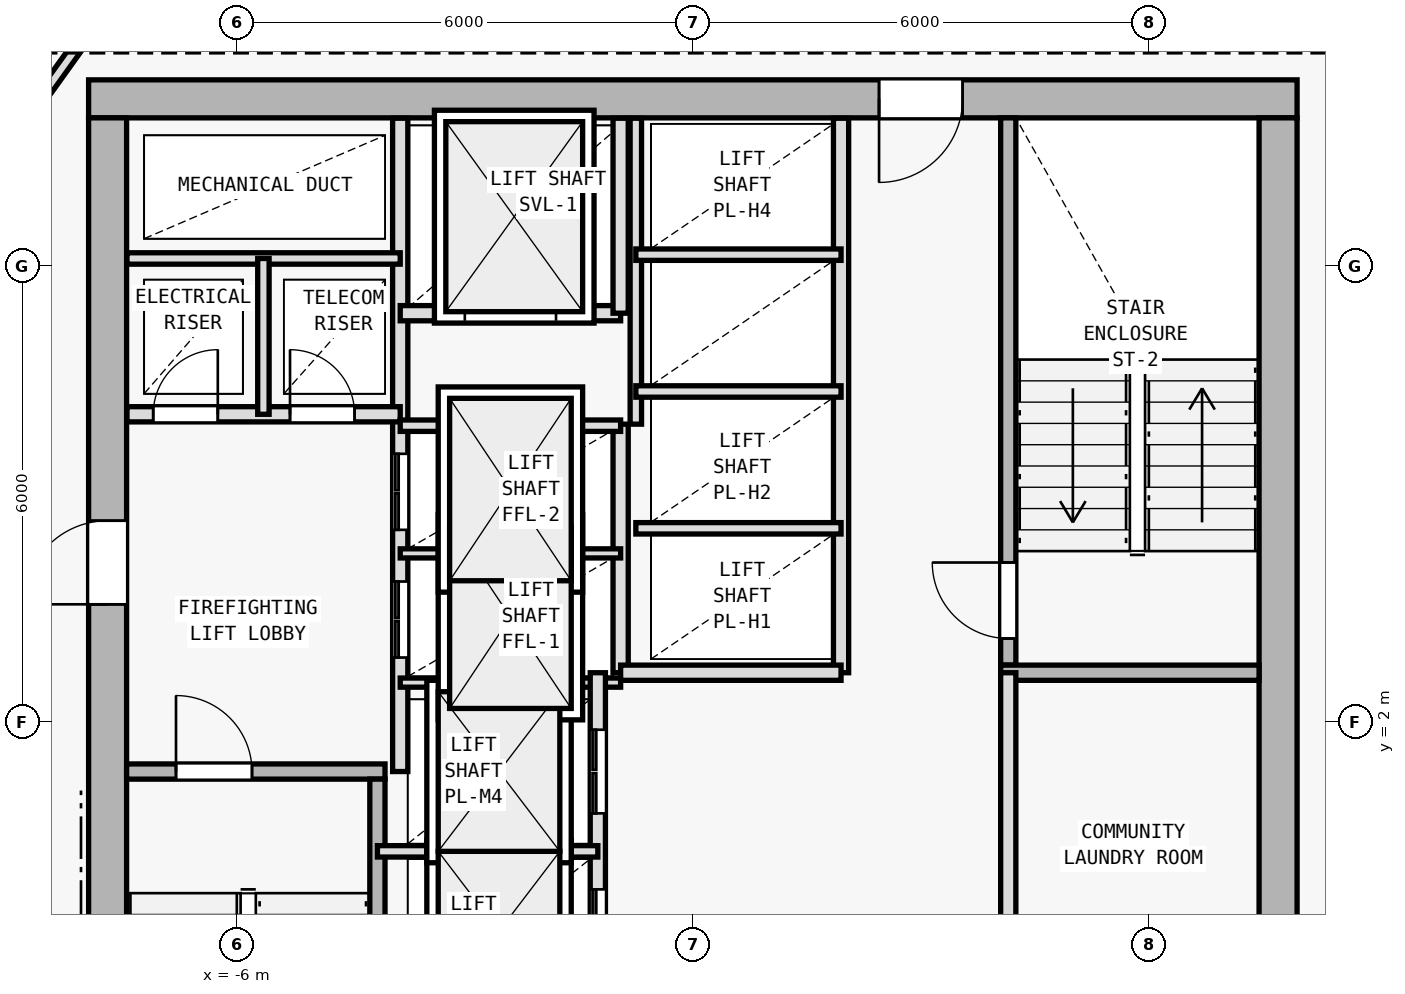
"""IFC4 building model, lengths in metres.
Left out: names, types, materials, properties, quantities, classifications, styles, units other than length and angle.
Written with IfcOpenShell. Run it as: python <this file> out.ifc"""

import sys

from ifc_helpers import new_model, si_unit, direction, frame, frame_2d, origin, origin_2d, place, context, subcontext, project, spatial, rectangle, i_section, extrude, element, fill, save


model = new_model("IFC4")
c1 = context("Model", 3, precision=1e-05, world=origin(), true_north=direction((0.0, 1.0)))
c2 = subcontext(c1, "Body", "Model", "MODEL_VIEW")
j1 = project(units=[si_unit("LENGTHUNIT", "METRE"), si_unit("PLANEANGLEUNIT", "RADIAN")], contexts=[c1])
p1 = place(None, origin())
s1 = spatial("IfcSite", under=j1, at=p1, CompositionType="ELEMENT")
p2 = place(p1, origin())
s2 = spatial("IfcBuilding", under=s1, at=p2, CompositionType="ELEMENT")
p3 = place(p2, frame((0.0, 0.0, 156.6)))
s3 = spatial("IfcBuildingStorey", under=s2, at=p3, CompositionType="ELEMENT", Elevation=156.6)
for number, where, z_axis, x_axis in (
    (1, (7.7, 10.2, 0.0), (0.0, 0.0, 1.0), (1.0, 0.0, 0.0)),
    (2, (-7.7, 10.2, 0.0), (0.0, 0.0, 1.0), (1.0, 0.0, 0.0)),
    (3, (7.7, 0.4, 0.0), (0.0, 0.0, 1.0), (1.0, 0.0, 0.0)),
    (4, (-7.7, 2.0, 0.0), (0.0, 0.0, 1.0), (1.0, 0.0, 0.0)),
):
    element("IfcColumn", number, at=place(p3, frame(where, z_axis=z_axis, x_axis=x_axis)), inside=s3, PredefinedType="COLUMN", context=c2, shape_type="SweptSolid", body=[
        extrude(i_section(OverallWidth=0.404, OverallDepth=0.407, WebThickness=0.017, FlangeThickness=0.028, FilletRadius=0.015, at=origin_2d()), origin(), (0.0, 0.0, 1.0), 3.6),
    ])
p4 = place(p3, frame((7.95, 10.2, 0.0), z_axis=(0.0, 0.0, 1.0), x_axis=(-1.0, 0.0, 0.0)))
e5 = element("IfcWall", 5, at=p4, inside=s3, PredefinedType="SHEAR", context=c2, shape_type="SweptSolid", body=[
    extrude(rectangle(XDim=15.9, YDim=0.5, at=frame_2d((7.95, 0.0))), origin(), (0.0, 0.0, 1.0), 3.35),
])
p5 = place(p4, frame((4.4, 0.0, 0.0)))
e6 = element("IfcOpeningElement", 6, at=p5, cuts=e5, PredefinedType="OPENING", context=c2, shape_type="SweptSolid", body=[
    extrude(rectangle(XDim=1.1, YDim=2.15, at=frame_2d((0.55, 1.075))), frame((0.0, 0.26, 0.0), z_axis=(0.0, -1.0, 0.0), x_axis=(1.0, 0.0, 0.0)), (0.0, 0.0, 1.0), 0.52),
])
p6 = place(p3, frame((-7.7, -9.15, 0.0), z_axis=(0.0, 0.0, 1.0), x_axis=(0.0, 1.0, 0.0)))
e7 = element("IfcWall", 7, at=p6, inside=s3, PredefinedType="SHEAR", context=c2, shape_type="SweptSolid", body=[
    extrude(rectangle(XDim=19.1, YDim=0.5, at=frame_2d((9.55, 0.0))), origin(), (0.0, 0.0, 1.0), 3.35),
])
p7 = place(p6, frame((12.7, 0.0, 0.0)))
e8 = element("IfcOpeningElement", 8, at=p7, cuts=e7, PredefinedType="OPENING", context=c2, shape_type="SweptSolid", body=[
    extrude(rectangle(XDim=1.1, YDim=2.15, at=frame_2d((0.55, 1.075))), frame((0.0, 0.26, 0.0), z_axis=(0.0, -1.0, 0.0), x_axis=(1.0, 0.0, 0.0)), (0.0, 0.0, 1.0), 0.52),
])
p8 = place(p3, frame((7.7, 9.95, 0.0), z_axis=(0.0, 0.0, 1.0), x_axis=(0.0, -1.0, 0.0)))
e9 = element("IfcWall", 9, at=p8, inside=s3, PredefinedType="SHEAR", context=c2, shape_type="SweptSolid", body=[
    extrude(rectangle(XDim=19.1, YDim=0.5, at=frame_2d((9.55, 0.0))), origin(), (0.0, 0.0, 1.0), 3.35),
])
p9 = place(p3, frame((-7.45, 1.35, 0.0), z_axis=(0.0, 0.0, 1.0), x_axis=(1.0, 0.0, 0.0)))
e10 = element("IfcWall", 10, at=p9, inside=s3, PredefinedType="SOLIDWALL", context=c2, shape_type="SweptSolid", body=[
    extrude(rectangle(XDim=3.4, YDim=0.2, at=frame_2d((1.7, 0.0))), origin(), (0.0, 0.0, 1.0), 3.35),
])
p10 = place(p9, frame((0.65, 0.0, 0.0)))
e11 = element("IfcOpeningElement", 11, at=p10, cuts=e10, PredefinedType="OPENING", context=c2, shape_type="SweptSolid", body=[
    extrude(rectangle(XDim=1.0, YDim=2.15, at=frame_2d((0.5, 1.075))), frame((0.0, 0.11, 0.0), z_axis=(0.0, -1.0, 0.0), x_axis=(1.0, 0.0, 0.0)), (0.0, 0.0, 1.0), 0.22),
])
p11 = place(p3, frame((-4.15, -5.95, 0.0), z_axis=(0.0, 0.0, 1.0), x_axis=(0.0, 1.0, 0.0)))
e12 = element("IfcWall", 12, at=p11, inside=s3, PredefinedType="SOLIDWALL", context=c2, shape_type="SweptSolid", body=[
    extrude(rectangle(XDim=7.2, YDim=0.2, at=frame_2d((3.6, 0.0))), origin(), (0.0, 0.0, 1.0), 3.35),
])
p12 = place(p3, frame((-3.85, 1.35, 0.0), z_axis=(0.0, 0.0, 1.0), x_axis=(0.0, 1.0, 0.0)))
e13 = element("IfcWall", 13, at=p12, inside=s3, PredefinedType="SOLIDWALL", context=c2, shape_type="SweptSolid", body=[
    extrude(rectangle(XDim=8.595, YDim=0.2, at=frame_2d((4.297, 0.0))), origin(), (0.0, 0.0, 1.0), 3.35),
])
p13 = place(p12, frame((1.5, 0.0, 0.0)))
e14 = element("IfcOpeningElement", 14, at=p13, cuts=e13, PredefinedType="OPENING", context=c2, shape_type="SweptSolid", body=[
    extrude(rectangle(XDim=1.0, YDim=2.15, at=frame_2d((0.5, 1.075))), frame((0.0, 0.11, 0.0), z_axis=(0.0, -1.0, 0.0), x_axis=(1.0, 0.0, 0.0)), (0.0, 0.0, 1.0), 0.22),
])
p14 = place(p12, frame((3.18, 0.0, 0.0)))
e15 = element("IfcOpeningElement", 15, at=p14, cuts=e13, PredefinedType="OPENING", context=c2, shape_type="SweptSolid", body=[
    extrude(rectangle(XDim=1.0, YDim=2.15, at=frame_2d((0.5, 1.075))), frame((0.0, 0.11, 0.0), z_axis=(0.0, -1.0, 0.0), x_axis=(1.0, 0.0, 0.0)), (0.0, 0.0, 1.0), 0.22),
])
p15 = place(p3, frame((-7.445, 6.05, 0.0), z_axis=(0.0, 0.0, 1.0), x_axis=(1.0, 0.0, 0.0)))
e16 = element("IfcWall", 16, at=p15, inside=s3, PredefinedType="SOLIDWALL", context=c2, shape_type="SweptSolid", body=[
    extrude(rectangle(XDim=3.595, YDim=0.2, at=frame_2d((1.797, 0.0))), origin(), (0.0, 0.0, 1.0), 3.35),
])
p16 = place(p15, frame((0.345, 0.0, 0.0)))
e17 = element("IfcOpeningElement", 17, at=p16, cuts=e16, PredefinedType="OPENING", context=c2, shape_type="SweptSolid", body=[
    extrude(rectangle(XDim=0.85, YDim=2.1, at=frame_2d((0.425, 1.05))), frame((0.0, 0.11, 0.0), z_axis=(0.0, -1.0, 0.0), x_axis=(1.0, 0.0, 0.0)), (0.0, 0.0, 1.0), 0.22),
])
p17 = place(p15, frame((2.145, 0.0, 0.0)))
e18 = element("IfcOpeningElement", 18, at=p17, cuts=e16, PredefinedType="OPENING", context=c2, shape_type="SweptSolid", body=[
    extrude(rectangle(XDim=0.85, YDim=2.1, at=frame_2d((0.425, 1.05))), frame((0.0, 0.11, 0.0), z_axis=(0.0, -1.0, 0.0), x_axis=(1.0, 0.0, 0.0)), (0.0, 0.0, 1.0), 0.22),
])
p18 = place(p3, frame((-7.445, 8.1, 0.0), z_axis=(0.0, 0.0, 1.0), x_axis=(1.0, 0.0, 0.0)))
e19 = element("IfcWall", 19, at=p18, inside=s3, PredefinedType="PARTITIONING", context=c2, shape_type="SweptSolid", body=[
    extrude(rectangle(XDim=3.595, YDim=0.15, at=frame_2d((1.797, 0.0))), origin(), (0.0, 0.0, 1.0), 3.35),
])
p19 = place(p3, frame((-5.65, 6.05, 0.0), z_axis=(0.0, 0.0, 1.0), x_axis=(0.0, 1.0, 0.0)))
e20 = element("IfcWall", 20, at=p19, inside=s3, PredefinedType="PARTITIONING", context=c2, shape_type="SweptSolid", body=[
    extrude(rectangle(XDim=2.05, YDim=0.15, at=frame_2d((1.025, 0.0))), origin(), (0.0, 0.0, 1.0), 3.35),
])
p20 = place(p3, frame((4.15, 2.75, 0.0), z_axis=(0.0, 0.0, 1.0), x_axis=(0.0, 1.0, 0.0)))
e21 = element("IfcWall", 21, at=p20, inside=s3, PredefinedType="SOLIDWALL", context=c2, shape_type="SweptSolid", body=[
    extrude(rectangle(XDim=7.2, YDim=0.2, at=frame_2d((3.6, 0.0))), origin(), (0.0, 0.0, 1.0), 3.35),
])
p21 = place(p20, frame((0.35, 0.0, 0.0)))
e22 = element("IfcOpeningElement", 22, at=p21, cuts=e21, PredefinedType="OPENING", context=c2, shape_type="SweptSolid", body=[
    extrude(rectangle(XDim=1.0, YDim=2.15, at=frame_2d((0.5, 1.075))), frame((0.0, 0.11, 0.0), z_axis=(0.0, -1.0, 0.0), x_axis=(1.0, 0.0, 0.0)), (0.0, 0.0, 1.0), 0.22),
])
p22 = place(p3, frame((4.05, 2.65, 0.0), z_axis=(0.0, 0.0, 1.0), x_axis=(1.0, 0.0, 0.0)))
e23 = element("IfcWall", 23, at=p22, inside=s3, PredefinedType="SOLIDWALL", context=c2, shape_type="SweptSolid", body=[
    extrude(rectangle(XDim=3.4, YDim=0.2, at=frame_2d((1.7, 0.0))), origin(), (0.0, 0.0, 1.0), 3.35),
])
p23 = place(p3, frame((-0.95, 2.65, 0.0), z_axis=(0.0, 0.0, 1.0), x_axis=(0.0, 1.0, 0.0)))
e24 = element("IfcWall", 24, at=p23, inside=s3, PredefinedType="SOLIDWALL", context=c2, shape_type="SweptSolid", body=[
    extrude(rectangle(XDim=3.27, YDim=0.2, at=frame_2d((1.635, 0.0))), origin(), (0.0, 0.0, 1.0), 3.35),
])
for number, where, z_axis, x_axis in (
    (25, (-3.85, 2.52, 0.0), (0.0, 0.0, 1.0), (1.0, 0.0, 0.0)),
    (26, (-3.85, 4.22, 0.0), (0.0, 0.0, 1.0), (1.0, 0.0, 0.0)),
):
    element("IfcWall", number, at=place(p3, frame(where, z_axis=z_axis, x_axis=x_axis)), inside=s3, PredefinedType="PARTITIONING", context=c2, shape_type="SweptSolid", body=[
        extrude(rectangle(XDim=2.9, YDim=0.12, at=frame_2d((1.45, 0.0))), origin(), (0.0, 0.0, 1.0), 3.35),
    ])
p24 = place(p3, frame((-3.85, 5.9, 0.0), z_axis=(0.0, 0.0, 1.0), x_axis=(1.0, 0.0, 0.0)))
e27 = element("IfcWall", 27, at=p24, inside=s3, PredefinedType="PARTITIONING", context=c2, shape_type="SweptSolid", body=[
    extrude(rectangle(XDim=2.9, YDim=0.15, at=frame_2d((1.45, 0.0))), origin(), (0.0, 0.0, 1.0), 3.35),
])
p25 = place(p3, frame((-3.85, 7.38, 0.0), z_axis=(0.0, 0.0, 1.0), x_axis=(1.0, 0.0, 0.0)))
e28 = element("IfcWall", 28, at=p25, inside=s3, PredefinedType="SOLIDWALL", context=c2, shape_type="SweptSolid", body=[
    extrude(rectangle(XDim=2.9, YDim=0.2, at=frame_2d((1.45, 0.0))), origin(), (0.0, 0.0, 1.0), 3.35),
])
p26 = place(p25, frame((0.85, 0.0, 0.0)))
e29 = element("IfcOpeningElement", 29, at=p26, cuts=e28, PredefinedType="OPENING", context=c2, shape_type="SweptSolid", body=[
    extrude(rectangle(XDim=1.2, YDim=2.2, at=frame_2d((0.6, 1.1))), frame((0.0, 0.11, 0.0), z_axis=(0.0, -1.0, 0.0), x_axis=(1.0, 0.0, 0.0)), (0.0, 0.0, 1.0), 0.22),
])
p27 = place(p3, frame((-0.95, 7.38, 0.0), z_axis=(0.0, 0.0, 1.0), x_axis=(0.0, 1.0, 0.0)))
e30 = element("IfcWall", 30, at=p27, inside=s3, PredefinedType="SOLIDWALL", context=c2, shape_type="SweptSolid", body=[
    extrude(rectangle(XDim=2.565, YDim=0.2, at=frame_2d((1.283, 0.0))), origin(), (0.0, 0.0, 1.0), 3.35),
])
p28 = place(p3, frame((4.15, -6.05, 0.0), z_axis=(0.0, 0.0, 1.0), x_axis=(0.0, 1.0, 0.0)))
e31 = element("IfcWall", 31, at=p28, inside=s3, PredefinedType="SOLIDWALL", context=c2, shape_type="SweptSolid", body=[
    extrude(rectangle(XDim=8.7, YDim=0.2, at=frame_2d((4.35, 0.0))), origin(), (0.0, 0.0, 1.0), 3.35),
])
p29 = place(p28, frame((3.6, 0.0, 0.0)))
e32 = element("IfcOpeningElement", 32, at=p29, cuts=e31, PredefinedType="OPENING", context=c2, shape_type="SweptSolid", body=[
    extrude(rectangle(XDim=0.95, YDim=2.1, at=frame_2d((0.475, 1.05))), frame((0.0, 0.11, 0.0), z_axis=(0.0, -1.0, 0.0), x_axis=(1.0, 0.0, 0.0)), (0.0, 0.0, 1.0), 0.22),
])
p30 = place(p3, frame((-1.25, -6.05, 0.0), z_axis=(0.0, 0.0, 1.0), x_axis=(0.0, 1.0, 0.0)))
e33 = element("IfcWall", 33, at=p30, inside=s3, PredefinedType="SOLIDWALL", context=c2, shape_type="SweptSolid", body=[
    extrude(rectangle(XDim=8.7, YDim=0.2, at=frame_2d((4.35, 0.0))), origin(), (0.0, 0.0, 1.0), 3.35),
])
p31 = place(p30, frame((0.55, 0.0, 0.0)))
e34 = element("IfcOpeningElement", 34, at=p31, cuts=e33, PredefinedType="OPENING", context=c2, shape_type="SweptSolid", body=[
    extrude(rectangle(XDim=1.1, YDim=2.15, at=frame_2d((0.55, 1.075))), frame((0.0, 0.11, 0.0), z_axis=(0.0, -1.0, 0.0), x_axis=(1.0, 0.0, 0.0)), (0.0, 0.0, 1.0), 0.22),
])
p32 = place(p30, frame((2.65, 0.0, 0.0)))
e35 = element("IfcOpeningElement", 35, at=p32, cuts=e33, PredefinedType="OPENING", context=c2, shape_type="SweptSolid", body=[
    extrude(rectangle(XDim=1.1, YDim=2.15, at=frame_2d((0.55, 1.075))), frame((0.0, 0.11, 0.0), z_axis=(0.0, -1.0, 0.0), x_axis=(1.0, 0.0, 0.0)), (0.0, 0.0, 1.0), 0.22),
])
p33 = place(p30, frame((4.75, 0.0, 0.0)))
e36 = element("IfcOpeningElement", 36, at=p33, cuts=e33, PredefinedType="OPENING", context=c2, shape_type="SweptSolid", body=[
    extrude(rectangle(XDim=1.1, YDim=2.15, at=frame_2d((0.55, 1.075))), frame((0.0, 0.11, 0.0), z_axis=(0.0, -1.0, 0.0), x_axis=(1.0, 0.0, 0.0)), (0.0, 0.0, 1.0), 0.22),
])
p34 = place(p30, frame((6.85, 0.0, 0.0)))
e37 = element("IfcOpeningElement", 37, at=p34, cuts=e33, PredefinedType="OPENING", context=c2, shape_type="SweptSolid", body=[
    extrude(rectangle(XDim=1.1, YDim=2.15, at=frame_2d((0.55, 1.075))), frame((0.0, 0.11, 0.0), z_axis=(0.0, -1.0, 0.0), x_axis=(1.0, 0.0, 0.0)), (0.0, 0.0, 1.0), 0.22),
])
p35 = place(p3, frame((-4.15, 0.3, 0.0), z_axis=(0.0, 0.0, 1.0), x_axis=(1.0, 0.0, 0.0)))
e38 = element("IfcWall", 38, at=p35, inside=s3, PredefinedType="PARTITIONING", context=c2, shape_type="SweptSolid", body=[
    extrude(rectangle(XDim=2.9, YDim=0.15, at=frame_2d((1.45, 0.0))), origin(), (0.0, 0.0, 1.0), 3.35),
])
p36 = place(p3, frame((1.95, 2.65, 0.0), z_axis=(0.0, 0.0, 1.0), x_axis=(0.0, 1.0, 0.0)))
e39 = element("IfcWall", 39, at=p36, inside=s3, PredefinedType="SOLIDWALL", context=c2, shape_type="SweptSolid", body=[
    extrude(rectangle(XDim=7.295, YDim=0.2, at=frame_2d((3.647, 0.0))), origin(), (0.0, 0.0, 1.0), 3.35),
])
p37 = place(p3, frame((-0.95, 2.65, 0.0), z_axis=(0.0, 0.0, 1.0), x_axis=(1.0, 0.0, 0.0)))
e40 = element("IfcWall", 40, at=p37, inside=s3, PredefinedType="SOLIDWALL", context=c2, shape_type="SweptSolid", body=[
    extrude(rectangle(XDim=2.9, YDim=0.2, at=frame_2d((1.45, 0.0))), origin(), (0.0, 0.0, 1.0), 3.35),
])
p38 = place(p3, frame((-0.75, 5.92, 0.0), z_axis=(0.0, 0.0, 1.0), x_axis=(0.0, 1.0, 0.0)))
e41 = element("IfcWall", 41, at=p38, inside=s3, PredefinedType="PARTITIONING", context=c2, shape_type="SweptSolid", body=[
    extrude(rectangle(XDim=4.025, YDim=0.15, at=frame_2d((2.013, 0.0))), origin(), (0.0, 0.0, 1.0), 3.35),
])
for number, where, z_axis, x_axis in (
    (42, (-0.75, 4.55, 0.0), (0.0, 0.0, 1.0), (1.0, 0.0, 0.0)),
    (43, (-0.75, 6.35, 0.0), (0.0, 0.0, 1.0), (1.0, 0.0, 0.0)),
    (44, (-0.75, 8.15, 0.0), (0.0, 0.0, 1.0), (1.0, 0.0, 0.0)),
):
    element("IfcWall", number, at=place(p3, frame(where, z_axis=z_axis, x_axis=x_axis)), inside=s3, PredefinedType="PARTITIONING", context=c2, shape_type="SweptSolid", body=[
        extrude(rectangle(XDim=2.7, YDim=0.15, at=frame_2d((1.35, 0.0))), origin(), (0.0, 0.0, 1.0), 3.35),
    ])
p39 = place(p3, frame((-9.86, 8.426, 0.0), z_axis=(0.0, 0.0, 1.0), x_axis=(0.582449511476, 0.812866881218, 0.0)))
e45 = element("IfcWall", 45, at=p39, inside=s3, PredefinedType="PARTITIONING", context=c2, shape_type="SweptSolid", body=[
    extrude(rectangle(XDim=4.84, YDim=0.15, at=frame_2d((2.42, 0.0))), origin(), (0.0, 0.0, 1.0), 2.965),
])
p40 = place(p3, frame((7.023, 12.36, 0.0), z_axis=(0.0, 0.0, 1.0), x_axis=(0.84376480085, -0.536713108511, 0.0)))
e46 = element("IfcWall", 46, at=p40, inside=s3, PredefinedType="PARTITIONING", context=c2, shape_type="SweptSolid", body=[
    extrude(rectangle(XDim=7.297, YDim=0.15, at=frame_2d((3.648, 0.0))), origin(), (0.0, 0.0, 1.0), 2.875),
])
p41 = place(p40, frame((3.198, 0.0, 0.0)))
e47 = element("IfcOpeningElement", 47, at=p41, cuts=e46, PredefinedType="OPENING", context=c2, shape_type="SweptSolid", body=[
    extrude(rectangle(XDim=0.9, YDim=2.1, at=frame_2d((0.45, 1.05))), frame((0.0, 0.085, 0.0), z_axis=(0.0, -1.0, 0.0), x_axis=(1.0, 0.0, 0.0)), (0.0, 0.0, 1.0), 0.17),
])
p42 = place(p7, origin())
e48 = element("IfcDoor", 48, at=p42, inside=s3, OperationType="SINGLE_SWING_LEFT", PredefinedType="DOOR", context=c2, shape_type="SweptSolid", body=[
    extrude(rectangle(XDim=1.1, YDim=2.15, at=frame_2d((0.55, 1.075))), frame((0.0, 0.025, 0.0), z_axis=(0.0, -1.0, 0.0), x_axis=(1.0, 0.0, 0.0)), (0.0, 0.0, 1.0), 0.05),
])
fill(e8, e48)
p43 = place(p5, origin())
e49 = element("IfcDoor", 49, at=p43, inside=s3, OperationType="SINGLE_SWING_RIGHT", PredefinedType="DOOR", context=c2, shape_type="SweptSolid", body=[
    extrude(rectangle(XDim=1.1, YDim=2.15, at=frame_2d((0.55, 1.075))), frame((0.0, 0.025, 0.0), z_axis=(0.0, -1.0, 0.0), x_axis=(1.0, 0.0, 0.0)), (0.0, 0.0, 1.0), 0.05),
])
fill(e6, e49)
p44 = place(p10, origin())
e50 = element("IfcDoor", 50, at=p44, inside=s3, OperationType="SINGLE_SWING_LEFT", PredefinedType="DOOR", context=c2, shape_type="SweptSolid", body=[
    extrude(rectangle(XDim=1.0, YDim=2.15, at=frame_2d((0.5, 1.075))), frame((0.0, 0.025, 0.0), z_axis=(0.0, -1.0, 0.0), x_axis=(1.0, 0.0, 0.0)), (0.0, 0.0, 1.0), 0.05),
])
fill(e11, e50)
p45 = place(p16, origin())
e51 = element("IfcDoor", 51, at=p45, inside=s3, OperationType="SINGLE_SWING_RIGHT", PredefinedType="DOOR", context=c2, shape_type="SweptSolid", body=[
    extrude(rectangle(XDim=0.85, YDim=2.1, at=frame_2d((0.425, 1.05))), frame((0.0, 0.025, 0.0), z_axis=(0.0, -1.0, 0.0), x_axis=(1.0, 0.0, 0.0)), (0.0, 0.0, 1.0), 0.05),
])
fill(e17, e51)
p46 = place(p17, origin())
e52 = element("IfcDoor", 52, at=p46, inside=s3, OperationType="SINGLE_SWING_LEFT", PredefinedType="DOOR", context=c2, shape_type="SweptSolid", body=[
    extrude(rectangle(XDim=0.85, YDim=2.1, at=frame_2d((0.425, 1.05))), frame((0.0, 0.025, 0.0), z_axis=(0.0, -1.0, 0.0), x_axis=(1.0, 0.0, 0.0)), (0.0, 0.0, 1.0), 0.05),
])
fill(e18, e52)
p47 = place(p21, origin())
e53 = element("IfcDoor", 53, at=p47, inside=s3, OperationType="SINGLE_SWING_RIGHT", PredefinedType="DOOR", context=c2, shape_type="SweptSolid", body=[
    extrude(rectangle(XDim=1.0, YDim=2.15, at=frame_2d((0.5, 1.075))), frame((0.0, 0.025, 0.0), z_axis=(0.0, -1.0, 0.0), x_axis=(1.0, 0.0, 0.0)), (0.0, 0.0, 1.0), 0.05),
])
fill(e22, e53)
p48 = place(p26, origin())
e54 = element("IfcDoor", 54, at=p48, inside=s3, OperationType="DOUBLE_DOOR_SLIDING", PredefinedType="DOOR", context=c2, shape_type="SweptSolid", body=[
    extrude(rectangle(XDim=1.2, YDim=2.2, at=frame_2d((0.6, 1.1))), frame((0.0, 0.025, 0.0), z_axis=(0.0, -1.0, 0.0), x_axis=(1.0, 0.0, 0.0)), (0.0, 0.0, 1.0), 0.05),
])
fill(e29, e54)
p49 = place(p33, origin())
e55 = element("IfcDoor", 55, at=p49, inside=s3, OperationType="DOUBLE_DOOR_SLIDING", PredefinedType="DOOR", context=c2, shape_type="SweptSolid", body=[
    extrude(rectangle(XDim=1.1, YDim=2.15, at=frame_2d((0.55, 1.075))), frame((0.0, 0.025, 0.0), z_axis=(0.0, -1.0, 0.0), x_axis=(1.0, 0.0, 0.0)), (0.0, 0.0, 1.0), 0.05),
])
fill(e36, e55)
p50 = place(p34, origin())
e56 = element("IfcDoor", 56, at=p50, inside=s3, OperationType="DOUBLE_DOOR_SLIDING", PredefinedType="DOOR", context=c2, shape_type="SweptSolid", body=[
    extrude(rectangle(XDim=1.1, YDim=2.15, at=frame_2d((0.55, 1.075))), frame((0.0, 0.025, 0.0), z_axis=(0.0, -1.0, 0.0), x_axis=(1.0, 0.0, 0.0)), (0.0, 0.0, 1.0), 0.05),
])
fill(e37, e56)
p51 = place(p13, origin())
e57 = element("IfcDoor", 57, at=p51, inside=s3, OperationType="DOUBLE_DOOR_SLIDING", PredefinedType="DOOR", context=c2, shape_type="SweptSolid", body=[
    extrude(rectangle(XDim=1.0, YDim=2.15, at=frame_2d((0.5, 1.075))), frame((0.0, 0.025, 0.0), z_axis=(0.0, -1.0, 0.0), x_axis=(1.0, 0.0, 0.0)), (0.0, 0.0, 1.0), 0.05),
])
fill(e14, e57)
p52 = place(p14, origin())
e58 = element("IfcDoor", 58, at=p52, inside=s3, OperationType="DOUBLE_DOOR_SLIDING", PredefinedType="DOOR", context=c2, shape_type="SweptSolid", body=[
    extrude(rectangle(XDim=1.0, YDim=2.15, at=frame_2d((0.5, 1.075))), frame((0.0, 0.025, 0.0), z_axis=(0.0, -1.0, 0.0), x_axis=(1.0, 0.0, 0.0)), (0.0, 0.0, 1.0), 0.05),
])
fill(e15, e58)
save(model, sys.argv[1])
